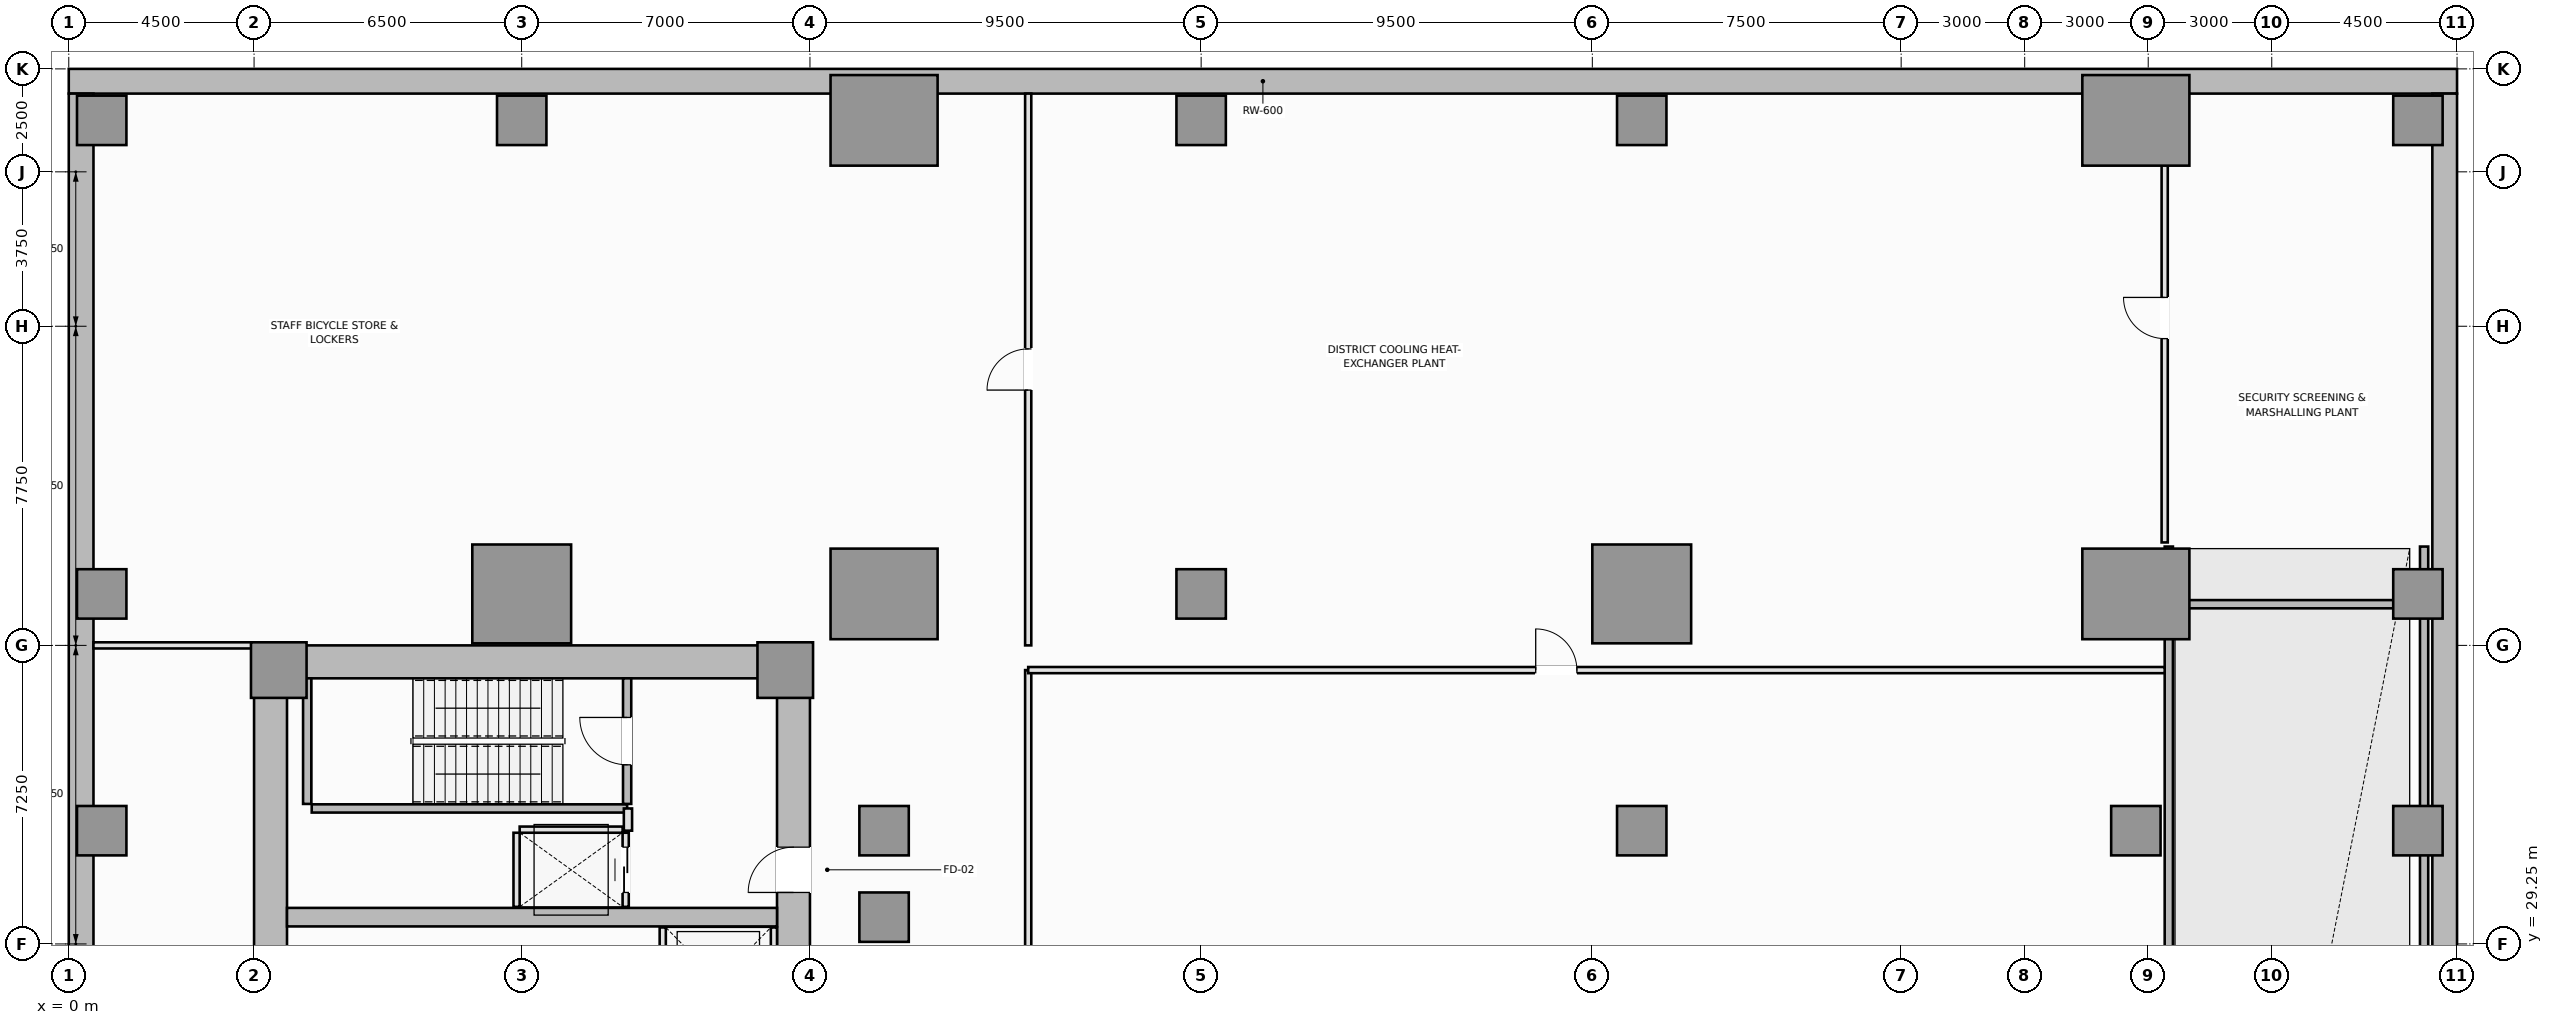
"""IFC4 building model, lengths in metres.
Left out: names, types, materials, properties, quantities, classifications, styles, units other than length and angle.
Written with IfcOpenShell. Run it as: python <this file> out.ifc"""

import sys

from ifc_helpers import new_model, si_unit, direction, frame, frame_2d, origin, origin_2d, place, context, subcontext, project, spatial, rectangle, extrude, element, fill, save


model = new_model("IFC4")
c1 = context("Model", 3, precision=1e-05, world=origin(), true_north=direction((0.0, 1.0)))
c2 = subcontext(c1, "Body", "Model", "MODEL_VIEW")
j1 = project(units=[si_unit("LENGTHUNIT", "METRE"), si_unit("PLANEANGLEUNIT", "RADIAN")], contexts=[c1])
p1 = place(None, origin())
s1 = spatial("IfcSite", under=j1, at=p1, CompositionType="ELEMENT")
p2 = place(p1, origin())
s2 = spatial("IfcBuilding", under=s1, at=p2, CompositionType="ELEMENT")
p3 = place(p2, frame((0.0, 0.0, -4.8)))
s3 = spatial("IfcBuildingStorey", under=s2, at=p3, CompositionType="ELEMENT", Elevation=-4.8)
p4 = place(p3, frame((0.0, 50.2, 0.0), z_axis=(0.0, 0.0, 1.0), x_axis=(1.0, 0.0, 0.0)))
e1 = element("IfcWall", 1, at=p4, inside=s3, PredefinedType="USERDEFINED", context=c2, shape_type="SweptSolid", body=[
    extrude(rectangle(XDim=58.0, YDim=0.6, at=frame_2d((29.0, 0.0))), origin(), (0.0, 0.0, 1.0), 4.8),
])
for number, where, z_axis, x_axis in (
    (2, (0.3, 0.6, 0.0), (0.0, 0.0, 1.0), (0.0, 1.0, 0.0)),
    (3, (57.7, 0.6, 0.0), (0.0, 0.0, 1.0), (0.0, 1.0, 0.0)),
):
    element("IfcWall", number, at=place(p3, frame(where, z_axis=z_axis, x_axis=x_axis)), inside=s3, PredefinedType="USERDEFINED", context=c2, shape_type="SweptSolid", body=[
        extrude(rectangle(XDim=49.3, YDim=0.6, at=frame_2d((24.65, 0.0))), origin(), (0.0, 0.0, 1.0), 4.8),
    ])
p5 = place(p3, frame((4.5, 36.1, 0.0), z_axis=(0.0, 0.0, 1.0), x_axis=(1.0, 0.0, 0.0)))
e4 = element("IfcWall", 4, at=p5, inside=s3, PredefinedType="SHEAR", context=c2, shape_type="SweptSolid", body=[
    extrude(rectangle(XDim=13.5, YDim=0.8, at=frame_2d((6.75, 0.0))), origin(), (0.0, 0.0, 1.0), 4.8),
])
p6 = place(p3, frame((4.9, 14.8, 0.0), z_axis=(0.0, 0.0, 1.0), x_axis=(0.0, 1.0, 0.0)))
e5 = element("IfcWall", 5, at=p6, inside=s3, PredefinedType="SHEAR", context=c2, shape_type="SweptSolid", body=[
    extrude(rectangle(XDim=20.9, YDim=0.8, at=frame_2d((10.45, 0.0))), origin(), (0.0, 0.0, 1.0), 4.8),
])
p7 = place(p3, frame((17.6, 27.05, 0.0), z_axis=(0.0, 0.0, 1.0), x_axis=(0.0, 1.0, 0.0)))
e6 = element("IfcWall", 6, at=p7, inside=s3, PredefinedType="SHEAR", context=c2, shape_type="SweptSolid", body=[
    extrude(rectangle(XDim=8.65, YDim=0.8, at=frame_2d((4.325, 0.0))), origin(), (0.0, 0.0, 1.0), 4.8),
])
p8 = place(p7, frame((3.45, 0.0, 0.0)))
e7 = element("IfcOpeningElement", 7, at=p8, cuts=e6, PredefinedType="OPENING", context=c2, shape_type="SweptSolid", body=[
    extrude(rectangle(XDim=1.1, YDim=2.15, at=frame_2d((0.55, 1.075))), frame((0.0, 0.41, 0.0), z_axis=(0.0, -1.0, 0.0), x_axis=(1.0, 0.0, 0.0)), (0.0, 0.0, 1.0), 0.82),
])
p9 = place(p3, frame((5.3, 29.9, 0.0), z_axis=(0.0, 0.0, 1.0), x_axis=(1.0, 0.0, 0.0)))
e8 = element("IfcWall", 8, at=p9, inside=s3, PredefinedType="SHEAR", context=c2, shape_type="SweptSolid", body=[
    extrude(rectangle(XDim=11.9, YDim=0.45, at=frame_2d((5.95, 0.0))), origin(), (0.0, 0.0, 1.0), 4.8),
])
for number, where, z_axis, x_axis in (
    (9, (5.1, 35.9, 0.0), (0.0, 0.0, 1.0), (1.0, 0.0, 0.0)),
    (10, (17.4, 35.9, 0.0), (0.0, 0.0, 1.0), (1.0, 0.0, 0.0)),
):
    element("IfcColumn", number, at=place(p3, frame(where, z_axis=z_axis, x_axis=x_axis)), inside=s3, PredefinedType="PILASTER", context=c2, shape_type="SweptSolid", body=[
        extrude(rectangle(XDim=1.35, YDim=1.35, at=origin_2d()), origin(), (0.0, 0.0, 1.0), 4.8),
    ])
for number, where, z_axis, x_axis in (
    (11, (11.0, 37.75, 0.0), (0.0, 0.0, 1.0), (1.0, 0.0, 0.0)),
    (12, (38.2, 37.75, 0.0), (0.0, 0.0, 1.0), (1.0, 0.0, 0.0)),
):
    element("IfcColumn", number, at=place(p3, frame(where, z_axis=z_axis, x_axis=x_axis)), inside=s3, PredefinedType="COLUMN", context=c2, shape_type="SweptSolid", body=[
        extrude(rectangle(XDim=2.4, YDim=2.4, at=origin_2d()), origin(), (0.0, 0.0, 1.0), 4.8),
    ])
for number, where, z_axis, x_axis in (
    (13, (27.5, 37.75, 0.0), (0.0, 0.0, 1.0), (1.0, 0.0, 0.0)),
    (14, (38.2, 32.0, 0.0), (0.0, 0.0, 1.0), (1.0, 0.0, 0.0)),
):
    element("IfcColumn", number, at=place(p3, frame(where, z_axis=z_axis, x_axis=x_axis)), inside=s3, PredefinedType="COLUMN", context=c2, shape_type="SweptSolid", body=[
        extrude(rectangle(XDim=1.2, YDim=1.2, at=origin_2d()), origin(), (0.0, 0.0, 1.0), 4.8),
    ])
for number, where, z_axis, x_axis in (
    (15, (19.8, 37.75, 0.0), (0.0, 0.0, 1.0), (1.0, 0.0, 0.0)),
    (16, (50.2, 37.75, 0.0), (0.0, 0.0, 1.0), (1.0, 0.0, 0.0)),
    (17, (19.8, 49.25, 0.0), (0.0, 0.0, 1.0), (1.0, 0.0, 0.0)),
    (18, (50.2, 49.25, 0.0), (0.0, 0.0, 1.0), (1.0, 0.0, 0.0)),
):
    element("IfcColumn", number, at=place(p3, frame(where, z_axis=z_axis, x_axis=x_axis)), inside=s3, PredefinedType="COLUMN", context=c2, shape_type="SweptSolid", body=[
        extrude(rectangle(XDim=2.6, YDim=2.2, at=origin_2d()), origin(), (0.0, 0.0, 1.0), 4.8),
    ])
for number, where, z_axis, x_axis in (
    (19, (19.8, 29.9, 0.0), (0.0, 0.0, 1.0), (1.0, 0.0, 0.0)),
    (20, (19.8, 32.0, 0.0), (0.0, 0.0, 1.0), (1.0, 0.0, 0.0)),
    (21, (50.2, 32.0, 0.0), (0.0, 0.0, 1.0), (1.0, 0.0, 0.0)),
    (22, (0.8, 32.0, 0.0), (0.0, 0.0, 1.0), (1.0, 0.0, 0.0)),
    (23, (57.05, 32.0, 0.0), (0.0, 0.0, 1.0), (1.0, 0.0, 0.0)),
    (24, (0.8, 37.75, 0.0), (0.0, 0.0, 1.0), (1.0, 0.0, 0.0)),
    (25, (57.05, 37.75, 0.0), (0.0, 0.0, 1.0), (1.0, 0.0, 0.0)),
    (26, (0.8, 49.25, 0.0), (0.0, 0.0, 1.0), (1.0, 0.0, 0.0)),
    (27, (57.05, 49.25, 0.0), (0.0, 0.0, 1.0), (1.0, 0.0, 0.0)),
    (28, (11.0, 49.25, 0.0), (0.0, 0.0, 1.0), (1.0, 0.0, 0.0)),
    (29, (27.5, 49.25, 0.0), (0.0, 0.0, 1.0), (1.0, 0.0, 0.0)),
    (30, (38.2, 49.25, 0.0), (0.0, 0.0, 1.0), (1.0, 0.0, 0.0)),
):
    element("IfcColumn", number, at=place(p3, frame(where, z_axis=z_axis, x_axis=x_axis)), inside=s3, PredefinedType="COLUMN", context=c2, shape_type="SweptSolid", body=[
        extrude(rectangle(XDim=1.2, YDim=1.2, at=origin_2d()), origin(), (0.0, 0.0, 1.0), 4.8),
    ])
p10 = place(p3, frame((5.79, 32.65, 0.0), z_axis=(0.0, 0.0, 1.0), x_axis=(0.0, 1.0, 0.0)))
e31 = element("IfcWall", 31, at=p10, inside=s3, PredefinedType="SOLIDWALL", context=c2, shape_type="SweptSolid", body=[
    extrude(rectangle(XDim=3.05, YDim=0.2, at=frame_2d((1.525, 0.0))), origin(), (0.0, 0.0, 1.0), 4.8),
])
p11 = place(p3, frame((5.9, 32.54, 0.0), z_axis=(0.0, 0.0, 1.0), x_axis=(1.0, 0.0, 0.0)))
e32 = element("IfcWall", 32, at=p11, inside=s3, PredefinedType="SOLIDWALL", context=c2, shape_type="SweptSolid", body=[
    extrude(rectangle(XDim=7.66, YDim=0.2, at=frame_2d((3.83, 0.0))), origin(), (0.0, 0.0, 1.0), 4.8),
])
p12 = place(p3, frame((13.56, 32.65, 0.0), z_axis=(0.0, 0.0, 1.0), x_axis=(0.0, 1.0, 0.0)))
e33 = element("IfcWall", 33, at=p12, inside=s3, PredefinedType="SOLIDWALL", context=c2, shape_type="SweptSolid", body=[
    extrude(rectangle(XDim=3.05, YDim=0.2, at=frame_2d((1.525, 0.0))), origin(), (0.0, 0.0, 1.0), 4.8),
])
p13 = place(p12, frame((0.95, 0.0, 0.0)))
e34 = element("IfcOpeningElement", 34, at=p13, cuts=e33, PredefinedType="OPENING", context=c2, shape_type="SweptSolid", body=[
    extrude(rectangle(XDim=1.15, YDim=2.15, at=frame_2d((0.575, 1.075))), frame((0.0, 0.11, 0.0), z_axis=(0.0, -1.0, 0.0), x_axis=(1.0, 0.0, 0.0)), (0.0, 0.0, 1.0), 0.22),
])
for number, where, z_axis, x_axis in (
    (35, (14.425, 27.05, 0.0), (0.0, 0.0, 1.0), (0.0, 1.0, 0.0)),
    (36, (17.125, 27.05, 0.0), (0.0, 0.0, 1.0), (0.0, 1.0, 0.0)),
):
    element("IfcWall", number, at=place(p3, frame(where, z_axis=z_axis, x_axis=x_axis)), inside=s3, PredefinedType="PARTITIONING", context=c2, shape_type="SweptSolid", body=[
        extrude(rectangle(XDim=2.6, YDim=0.15, at=frame_2d((1.3, 0.0))), origin(), (0.0, 0.0, 1.0), 4.6),
    ])
p14 = place(p3, frame((10.95, 32.025, 0.0), z_axis=(0.0, 0.0, 1.0), x_axis=(1.0, 0.0, 0.0)))
e37 = element("IfcWall", 37, at=p14, inside=s3, PredefinedType="PARTITIONING", context=c2, shape_type="SweptSolid", body=[
    extrude(rectangle(XDim=2.5, YDim=0.15, at=frame_2d((1.25, 0.0))), origin(), (0.0, 0.0, 1.0), 4.6),
])
p15 = place(p3, frame((10.875, 30.15, 0.0), z_axis=(0.0, 0.0, 1.0), x_axis=(0.0, 1.0, 0.0)))
e38 = element("IfcWall", 38, at=p15, inside=s3, PredefinedType="PARTITIONING", context=c2, shape_type="SweptSolid", body=[
    extrude(rectangle(XDim=1.8, YDim=0.15, at=frame_2d((0.9, 0.0))), origin(), (0.0, 0.0, 1.0), 4.6),
])
p16 = place(p3, frame((13.525, 30.15, 0.0), z_axis=(0.0, 0.0, 1.0), x_axis=(0.0, 1.0, 0.0)))
e39 = element("IfcWall", 39, at=p16, inside=s3, PredefinedType="PARTITIONING", context=c2, shape_type="SweptSolid", body=[
    extrude(rectangle(XDim=1.8, YDim=0.15, at=frame_2d((0.9, 0.0))), origin(), (0.0, 0.0, 1.0), 4.6),
])
p17 = place(p16, frame((0.35, 0.0, 0.0)))
e40 = element("IfcOpeningElement", 40, at=p17, cuts=e39, PredefinedType="OPENING", context=c2, shape_type="SweptSolid", body=[
    extrude(rectangle(XDim=1.1, YDim=2.2, at=frame_2d((0.55, 1.1))), frame((0.0, 0.085, 0.0), z_axis=(0.0, -1.0, 0.0), x_axis=(1.0, 0.0, 0.0)), (0.0, 0.0, 1.0), 0.17),
])
for number, where, z_axis, x_axis in (
    (41, (51.0, 9.9, 0.0), (0.0, 0.0, 1.0), (0.0, 1.0, 0.0)),
    (42, (57.2, 9.9, 0.0), (0.0, 0.0, 1.0), (0.0, 1.0, 0.0)),
):
    element("IfcWall", number, at=place(p3, frame(where, z_axis=z_axis, x_axis=x_axis)), inside=s3, PredefinedType="SOLIDWALL", context=c2, shape_type="SweptSolid", body=[
        extrude(rectangle(XDim=29.0, YDim=0.2, at=frame_2d((14.5, 0.0))), origin(), (0.0, 0.0, 1.0), 4.8),
    ])
p18 = place(p3, frame((51.0, 37.5, 0.0), z_axis=(0.0, 0.0, 1.0), x_axis=(1.0, 0.0, 0.0)))
e43 = element("IfcWall", 43, at=p18, inside=s3, PredefinedType="SOLIDWALL", context=c2, shape_type="SweptSolid", body=[
    extrude(rectangle(XDim=6.2, YDim=0.2, at=frame_2d((3.1, 0.0))), origin(), (0.0, 0.0, 1.0), 4.8),
])
p19 = place(p3, frame((13.58, 32.0, 0.0), z_axis=(0.0, 0.0, 1.0), x_axis=(0.0, 1.0, 0.0)))
e44 = element("IfcWall", 44, at=p19, inside=s3, PredefinedType="PARTITIONING", context=c2, shape_type="SweptSolid", body=[
    extrude(rectangle(XDim=0.54, YDim=0.2, at=frame_2d((0.27, 0.0))), origin(), (0.0, 0.0, 1.0), 4.6),
])
p20 = place(p3, frame((23.3, 14.6, 0.0), z_axis=(0.0, 0.0, 1.0), x_axis=(0.0, 1.0, 0.0)))
e45 = element("IfcWall", 45, at=p20, inside=s3, PredefinedType="PARTITIONING", context=c2, shape_type="SweptSolid", body=[
    extrude(rectangle(XDim=21.3, YDim=0.15, at=frame_2d((10.65, 0.0))), origin(), (0.0, 0.0, 1.0), 4.6),
])
p21 = place(p20, frame((9.75, 0.0, 0.0)))
e46 = element("IfcOpeningElement", 46, at=p21, cuts=e45, PredefinedType="OPENING", context=c2, shape_type="SweptSolid", body=[
    extrude(rectangle(XDim=1.8, YDim=2.2, at=frame_2d((0.9, 1.1))), frame((0.0, 0.085, 0.0), z_axis=(0.0, -1.0, 0.0), x_axis=(1.0, 0.0, 0.0)), (0.0, 0.0, 1.0), 0.17),
])
p22 = place(p3, frame((0.6, 36.5, 0.0), z_axis=(0.0, 0.0, 1.0), x_axis=(1.0, 0.0, 0.0)))
e47 = element("IfcWall", 47, at=p22, inside=s3, PredefinedType="PARTITIONING", context=c2, shape_type="SweptSolid", body=[
    extrude(rectangle(XDim=3.9, YDim=0.15, at=frame_2d((1.95, 0.0))), origin(), (0.0, 0.0, 1.0), 4.6),
])
p23 = place(p3, frame((23.3, 36.5, 0.0), z_axis=(0.0, 0.0, 1.0), x_axis=(0.0, 1.0, 0.0)))
e48 = element("IfcWall", 48, at=p23, inside=s3, PredefinedType="PARTITIONING", context=c2, shape_type="SweptSolid", body=[
    extrude(rectangle(XDim=13.4, YDim=0.15, at=frame_2d((6.7, 0.0))), origin(), (0.0, 0.0, 1.0), 4.6),
])
p24 = place(p23, frame((6.2, 0.0, 0.0)))
e49 = element("IfcOpeningElement", 49, at=p24, cuts=e48, PredefinedType="OPENING", context=c2, shape_type="SweptSolid", body=[
    extrude(rectangle(XDim=1.0, YDim=2.15, at=frame_2d((0.5, 1.075))), frame((0.0, 0.085, 0.0), z_axis=(0.0, -1.0, 0.0), x_axis=(1.0, 0.0, 0.0)), (0.0, 0.0, 1.0), 0.17),
])
p25 = place(p3, frame((23.3, 35.9, 0.0), z_axis=(0.0, 0.0, 1.0), x_axis=(1.0, 0.0, 0.0)))
e50 = element("IfcWall", 50, at=p25, inside=s3, PredefinedType="PARTITIONING", context=c2, shape_type="SweptSolid", body=[
    extrude(rectangle(XDim=27.6, YDim=0.15, at=frame_2d((13.8, 0.0))), origin(), (0.0, 0.0, 1.0), 4.6),
])
p26 = place(p25, frame((12.325, 0.0, 0.0)))
e51 = element("IfcOpeningElement", 51, at=p26, cuts=e50, PredefinedType="OPENING", context=c2, shape_type="SweptSolid", body=[
    extrude(rectangle(XDim=1.0, YDim=2.15, at=frame_2d((0.5, 1.075))), frame((0.0, 0.085, 0.0), z_axis=(0.0, -1.0, 0.0), x_axis=(1.0, 0.0, 0.0)), (0.0, 0.0, 1.0), 0.17),
])
p27 = place(p3, frame((50.9, 39.0, 0.0), z_axis=(0.0, 0.0, 1.0), x_axis=(0.0, 1.0, 0.0)))
e52 = element("IfcWall", 52, at=p27, inside=s3, PredefinedType="PARTITIONING", context=c2, shape_type="SweptSolid", body=[
    extrude(rectangle(XDim=10.9, YDim=0.15, at=frame_2d((5.45, 0.0))), origin(), (0.0, 0.0, 1.0), 4.6),
])
p28 = place(p27, frame((4.95, 0.0, 0.0)))
e53 = element("IfcOpeningElement", 53, at=p28, cuts=e52, PredefinedType="OPENING", context=c2, shape_type="SweptSolid", body=[
    extrude(rectangle(XDim=1.0, YDim=2.15, at=frame_2d((0.5, 1.075))), frame((0.0, 0.085, 0.0), z_axis=(0.0, -1.0, 0.0), x_axis=(1.0, 0.0, 0.0)), (0.0, 0.0, 1.0), 0.17),
])
p29 = place(p13, origin())
e54 = element("IfcDoor", 54, at=p29, inside=s3, OperationType="SINGLE_SWING_RIGHT", PredefinedType="DOOR", context=c2, shape_type="SweptSolid", body=[
    extrude(rectangle(XDim=1.15, YDim=2.15, at=frame_2d((0.575, 1.075))), frame((0.0, 0.025, 0.0), z_axis=(0.0, -1.0, 0.0), x_axis=(1.0, 0.0, 0.0)), (0.0, 0.0, 1.0), 0.05),
])
fill(e34, e54)
p30 = place(p17, origin())
e55 = element("IfcDoor", 55, at=p30, inside=s3, OperationType="DOUBLE_DOOR_SLIDING", PredefinedType="DOOR", context=c2, shape_type="SweptSolid", body=[
    extrude(rectangle(XDim=1.1, YDim=2.2, at=frame_2d((0.55, 1.1))), frame((0.0, 0.025, 0.0), z_axis=(0.0, -1.0, 0.0), x_axis=(1.0, 0.0, 0.0)), (0.0, 0.0, 1.0), 0.05),
])
fill(e40, e55)
p31 = place(p8, origin())
e56 = element("IfcDoor", 56, at=p31, inside=s3, OperationType="SINGLE_SWING_LEFT", PredefinedType="DOOR", context=c2, shape_type="SweptSolid", body=[
    extrude(rectangle(XDim=1.1, YDim=2.15, at=frame_2d((0.55, 1.075))), frame((0.0, 0.025, 0.0), z_axis=(0.0, -1.0, 0.0), x_axis=(1.0, 0.0, 0.0)), (0.0, 0.0, 1.0), 0.05),
])
fill(e7, e56)
p32 = place(p24, origin())
e57 = element("IfcDoor", 57, at=p32, inside=s3, OperationType="SINGLE_SWING_LEFT", PredefinedType="DOOR", context=c2, shape_type="SweptSolid", body=[
    extrude(rectangle(XDim=1.0, YDim=2.15, at=frame_2d((0.5, 1.075))), frame((0.0, 0.025, 0.0), z_axis=(0.0, -1.0, 0.0), x_axis=(1.0, 0.0, 0.0)), (0.0, 0.0, 1.0), 0.05),
])
fill(e49, e57)
p33 = place(p26, origin())
e58 = element("IfcDoor", 58, at=p33, inside=s3, OperationType="SINGLE_SWING_LEFT", PredefinedType="DOOR", context=c2, shape_type="SweptSolid", body=[
    extrude(rectangle(XDim=1.0, YDim=2.15, at=frame_2d((0.5, 1.075))), frame((0.0, 0.025, 0.0), z_axis=(0.0, -1.0, 0.0), x_axis=(1.0, 0.0, 0.0)), (0.0, 0.0, 1.0), 0.05),
])
fill(e51, e58)
p34 = place(p28, origin())
e59 = element("IfcDoor", 59, at=p34, inside=s3, OperationType="SINGLE_SWING_RIGHT", PredefinedType="DOOR", context=c2, shape_type="SweptSolid", body=[
    extrude(rectangle(XDim=1.0, YDim=2.15, at=frame_2d((0.5, 1.075))), frame((0.0, 0.025, 0.0), z_axis=(0.0, -1.0, 0.0), x_axis=(1.0, 0.0, 0.0)), (0.0, 0.0, 1.0), 0.05),
])
fill(e53, e59)
save(model, sys.argv[1])
